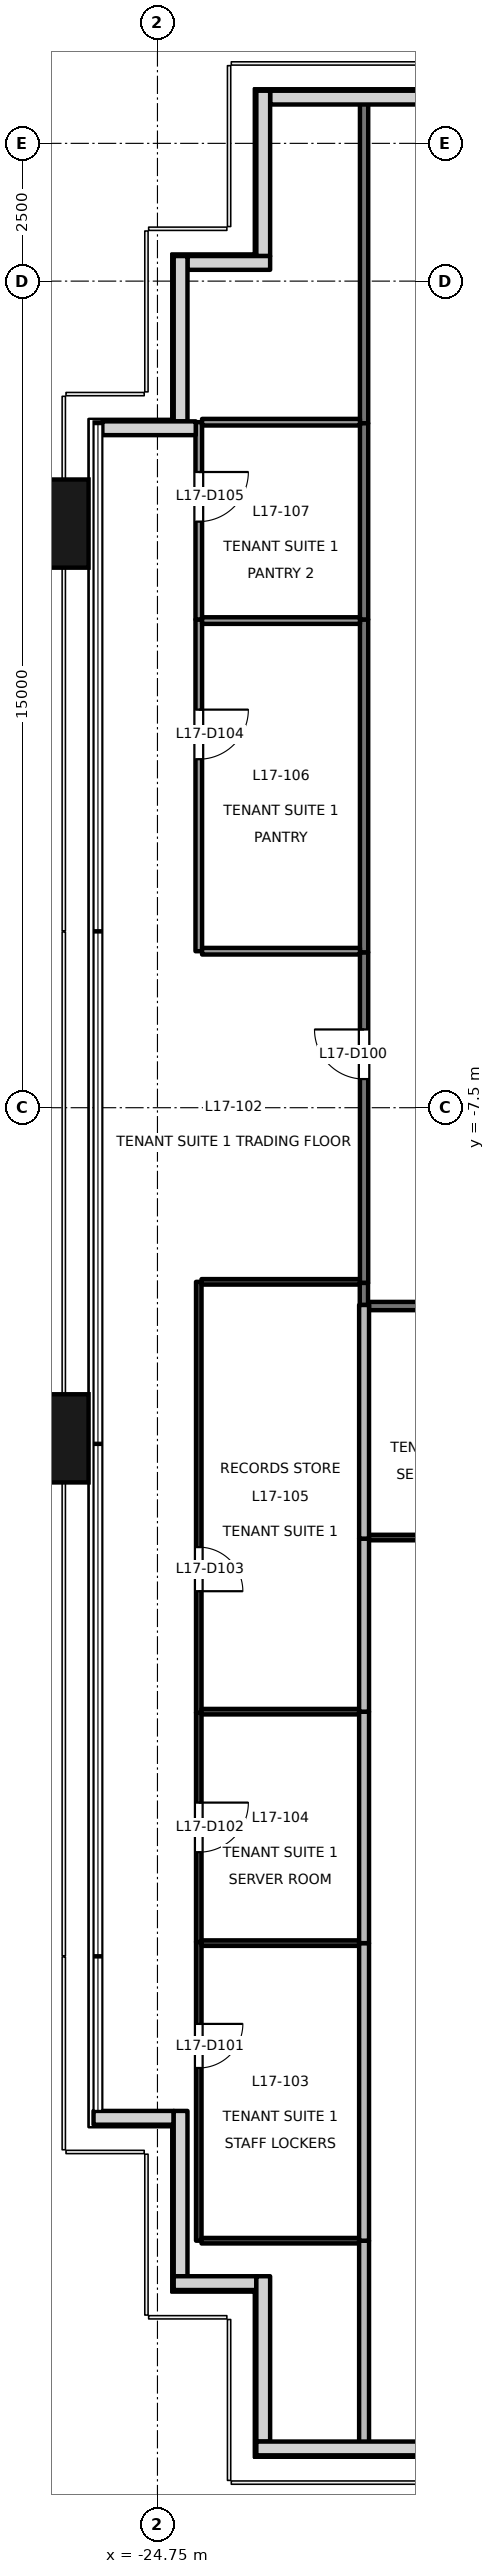
"""IFC4 building model, lengths in metres.
Left out: names, types, materials, properties, quantities, classifications, styles, units other than length and angle.
Written with IfcOpenShell. Run it as: python <this file> out.ifc"""

import sys

from ifc_helpers import new_model, si_unit, direction, frame, frame_2d, origin, origin_2d, place, context, subcontext, project, spatial, rectangle, extrude, element, fill, save


model = new_model("IFC4")
c1 = context("Model", 3, precision=1e-05, world=origin(), true_north=direction((0.0, 1.0)))
c2 = subcontext(c1, "Body", "Model", "MODEL_VIEW")
j1 = project(units=[si_unit("LENGTHUNIT", "METRE"), si_unit("PLANEANGLEUNIT", "RADIAN")], contexts=[c1])
p1 = place(None, origin())
s1 = spatial("IfcSite", under=j1, at=p1, CompositionType="ELEMENT")
p2 = place(p1, origin())
s2 = spatial("IfcBuilding", under=s1, at=p2, CompositionType="ELEMENT")
p3 = place(p2, frame((0.0, 0.0, 79.7)))
s3 = spatial("IfcBuildingStorey", under=s2, at=p3, CompositionType="ELEMENT", Elevation=79.7)
for number, where, z_axis, x_axis in (
    (1, (-26.9, -13.5, -0.2), (0.0, 0.0, 1.0), (0.0, 1.0, 0.0)),
    (2, (-26.9, 3.1, -0.2), (0.0, 0.0, 1.0), (0.0, 1.0, 0.0)),
):
    element("IfcColumn", number, at=place(p3, frame(where, z_axis=z_axis, x_axis=x_axis)), inside=s3, PredefinedType="COLUMN", context=c2, shape_type="SweptSolid", body=[
        extrude(rectangle(XDim=1.6, YDim=1.8, at=origin_2d()), origin(), (0.0, 0.0, 1.0), 4.0),
    ])
p4 = place(p3, frame((-20.0, 10.83, 0.0), z_axis=(0.0, 0.0, 1.0), x_axis=(-1.0, 0.0, 0.0)))
e3 = element("IfcWall", 3, at=p4, inside=s3, PredefinedType="SOLIDWALL", context=c2, shape_type="SweptSolid", body=[
    extrude(rectangle(XDim=2.705, YDim=0.25, at=frame_2d((1.353, 0.0))), origin(), (0.0, 0.0, 1.0), 3.8),
])
p5 = place(p3, frame((-22.83, 10.955, 0.0), z_axis=(0.0, 0.0, 1.0), x_axis=(0.0, -1.0, 0.0)))
e4 = element("IfcWall", 4, at=p5, inside=s3, PredefinedType="SOLIDWALL", context=c2, shape_type="SweptSolid", body=[
    extrude(rectangle(XDim=3.0, YDim=0.25, at=frame_2d((1.5, 0.0))), origin(), (0.0, 0.0, 1.0), 3.8),
])
p6 = place(p3, frame((-22.705, 7.83, 0.0), z_axis=(0.0, 0.0, 1.0), x_axis=(-1.0, 0.0, 0.0)))
e5 = element("IfcWall", 5, at=p6, inside=s3, PredefinedType="SOLIDWALL", context=c2, shape_type="SweptSolid", body=[
    extrude(rectangle(XDim=1.5, YDim=0.25, at=frame_2d((0.75, 0.0))), origin(), (0.0, 0.0, 1.0), 3.8),
])
p7 = place(p3, frame((-24.33, 7.955, 0.0), z_axis=(0.0, 0.0, 1.0), x_axis=(0.0, -1.0, 0.0)))
e6 = element("IfcWall", 6, at=p7, inside=s3, PredefinedType="SOLIDWALL", context=c2, shape_type="SweptSolid", body=[
    extrude(rectangle(XDim=3.0, YDim=0.25, at=frame_2d((1.5, 0.0))), origin(), (0.0, 0.0, 1.0), 3.8),
])
p8 = place(p3, frame((-24.055, 4.83, 0.0), z_axis=(0.0, 0.0, 1.0), x_axis=(-1.0, 0.0, 0.0)))
e7 = element("IfcWall", 7, at=p8, inside=s3, PredefinedType="SOLIDWALL", context=c2, shape_type="SweptSolid", body=[
    extrude(rectangle(XDim=1.695, YDim=0.25, at=frame_2d((0.848, 0.0))), origin(), (0.0, 0.0, 1.0), 3.8),
])
p9 = place(p3, frame((-25.91, -25.83, 0.0), z_axis=(0.0, 0.0, 1.0), x_axis=(1.0, 0.0, 0.0)))
e8 = element("IfcWall", 8, at=p9, inside=s3, PredefinedType="SOLIDWALL", context=c2, shape_type="SweptSolid", body=[
    extrude(rectangle(XDim=1.455, YDim=0.25, at=frame_2d((0.728, 0.0))), origin(), (0.0, 0.0, 1.0), 3.8),
])
p10 = place(p3, frame((-24.33, -25.705, 0.0), z_axis=(0.0, 0.0, 1.0), x_axis=(0.0, -1.0, 0.0)))
e9 = element("IfcWall", 9, at=p10, inside=s3, PredefinedType="SOLIDWALL", context=c2, shape_type="SweptSolid", body=[
    extrude(rectangle(XDim=3.0, YDim=0.25, at=frame_2d((1.5, 0.0))), origin(), (0.0, 0.0, 1.0), 3.8),
])
p11 = place(p3, frame((-24.455, -28.83, 0.0), z_axis=(0.0, 0.0, 1.0), x_axis=(1.0, 0.0, 0.0)))
e10 = element("IfcWall", 10, at=p11, inside=s3, PredefinedType="SOLIDWALL", context=c2, shape_type="SweptSolid", body=[
    extrude(rectangle(XDim=1.5, YDim=0.25, at=frame_2d((0.75, 0.0))), origin(), (0.0, 0.0, 1.0), 3.8),
])
p12 = place(p3, frame((-22.83, -28.705, 0.0), z_axis=(0.0, 0.0, 1.0), x_axis=(0.0, -1.0, 0.0)))
e11 = element("IfcWall", 11, at=p12, inside=s3, PredefinedType="SOLIDWALL", context=c2, shape_type="SweptSolid", body=[
    extrude(rectangle(XDim=3.0, YDim=0.25, at=frame_2d((1.5, 0.0))), origin(), (0.0, 0.0, 1.0), 3.8),
])
p13 = place(p3, frame((-22.955, -31.83, 0.0), z_axis=(0.0, 0.0, 1.0), x_axis=(1.0, 0.0, 0.0)))
e12 = element("IfcWall", 12, at=p13, inside=s3, PredefinedType="SOLIDWALL", context=c2, shape_type="SweptSolid", body=[
    extrude(rectangle(XDim=2.955, YDim=0.25, at=frame_2d((1.478, 0.0))), origin(), (0.0, 0.0, 1.0), 3.8),
])
p14 = place(p3, frame((-21.0, -10.68, 0.0), z_axis=(0.0, 0.0, 1.0), x_axis=(0.0, 1.0, 0.0)))
e13 = element("IfcWall", 13, at=p14, inside=s3, PredefinedType="PARTITIONING", context=c2, shape_type="SweptSolid", body=[
    extrude(rectangle(XDim=6.0, YDim=0.15, at=frame_2d((3.0, 0.0))), origin(), (0.0, 0.0, 1.0), 3.8),
])
p15 = place(p14, frame((3.7, 0.0, 0.0)))
e14 = element("IfcOpeningElement", 14, at=p15, cuts=e13, PredefinedType="OPENING", context=c2, shape_type="SweptSolid", body=[
    extrude(rectangle(XDim=0.9, YDim=2.1, at=frame_2d((0.45, 1.05))), frame((0.0, 0.085, 0.0), z_axis=(0.0, -1.0, 0.0), x_axis=(1.0, 0.0, 0.0)), (0.0, 0.0, 1.0), 0.171),
])
p16 = place(p3, frame((-21.0, 4.92, 0.0), z_axis=(0.0, 0.0, 1.0), x_axis=(0.0, 1.0, 0.0)))
e15 = element("IfcWall", 15, at=p16, inside=s3, PredefinedType="PARTITIONING", context=c2, shape_type="SweptSolid", body=[
    extrude(rectangle(XDim=5.82, YDim=0.15, at=frame_2d((2.91, 0.0))), origin(), (0.0, 0.0, 1.0), 3.8),
])
p17 = place(p3, frame((-21.003, -11.08, 0.0), z_axis=(0.0, 0.0, 1.0), x_axis=(0.0, 1.0, 0.0)))
e16 = element("IfcWall", 16, at=p17, inside=s3, PredefinedType="PARTITIONING", context=c2, shape_type="SweptSolid", body=[
    extrude(rectangle(XDim=0.4, YDim=0.15, at=frame_2d((0.2, 0.0))), origin(), (0.0, 0.0, 1.0), 3.8),
])
p18 = place(p3, frame((-21.0, -4.68, 0.0), z_axis=(0.0, 0.0, 1.0), x_axis=(0.0, 1.0, 0.0)))
e17 = element("IfcWall", 17, at=p18, inside=s3, PredefinedType="PARTITIONING", context=c2, shape_type="SweptSolid", body=[
    extrude(rectangle(XDim=6.04, YDim=0.15, at=frame_2d((3.02, 0.0))), origin(), (0.0, 0.0, 1.0), 3.4),
])
p19 = place(p3, frame((-21.0, 1.36, 0.0), z_axis=(0.0, 0.0, 1.0), x_axis=(0.0, 1.0, 0.0)))
e18 = element("IfcWall", 18, at=p19, inside=s3, PredefinedType="PARTITIONING", context=c2, shape_type="SweptSolid", body=[
    extrude(rectangle(XDim=3.56, YDim=0.15, at=frame_2d((1.78, 0.0))), origin(), (0.0, 0.0, 1.0), 3.4),
])
p20 = place(p3, frame((-18.02, -11.099, 0.0), z_axis=(0.0, 0.0, 1.0), x_axis=(-1.0, 0.0, 0.0)))
e19 = element("IfcWall", 19, at=p20, inside=s3, PredefinedType="PARTITIONING", context=c2, shape_type="SweptSolid", body=[
    extrude(rectangle(XDim=2.89, YDim=0.15, at=frame_2d((1.445, 0.0))), origin(), (0.0, 0.0, 1.0), 3.8),
])
p21 = place(p3, frame((-24.0, -22.64, 0.0), z_axis=(0.0, 0.0, 1.0), x_axis=(0.0, -1.0, 0.0)))
e20 = element("IfcWall", 20, at=p21, inside=s3, PredefinedType="PARTITIONING", context=c2, shape_type="SweptSolid", body=[
    extrude(rectangle(XDim=5.42, YDim=0.1, at=frame_2d((2.71, 0.0))), origin(), (0.0, 0.0, 1.0), 3.8),
])
p22 = place(p21, frame((1.486, 0.0, 0.0)))
e21 = element("IfcOpeningElement", 21, at=p22, cuts=e20, PredefinedType="OPENING", context=c2, shape_type="SweptSolid", body=[
    extrude(rectangle(XDim=0.8, YDim=2.1, at=frame_2d((0.4, 1.05))), frame((0.0, 0.061, 0.0), z_axis=(0.0, -1.0, 0.0), x_axis=(1.0, 0.0, 0.0)), (0.0, 0.0, 1.0), 0.121),
])
p23 = place(p3, frame((-23.95, -28.06, 0.0), z_axis=(0.0, 0.0, 1.0), x_axis=(1.0, 0.0, 0.0)))
e22 = element("IfcWall", 22, at=p23, inside=s3, PredefinedType="PARTITIONING", context=c2, shape_type="SweptSolid", body=[
    extrude(rectangle(XDim=2.86, YDim=0.1, at=frame_2d((1.43, 0.0))), origin(), (0.0, 0.0, 1.0), 3.8),
])
p24 = place(p3, frame((-24.0, -18.48, 0.0), z_axis=(0.0, 0.0, 1.0), x_axis=(0.0, -1.0, 0.0)))
e23 = element("IfcWall", 23, at=p24, inside=s3, PredefinedType="PARTITIONING", context=c2, shape_type="SweptSolid", body=[
    extrude(rectangle(XDim=4.16, YDim=0.1, at=frame_2d((2.08, 0.0))), origin(), (0.0, 0.0, 1.0), 3.8),
])
p25 = place(p24, frame((1.63, 0.0, 0.0)))
e24 = element("IfcOpeningElement", 24, at=p25, cuts=e23, PredefinedType="OPENING", context=c2, shape_type="SweptSolid", body=[
    extrude(rectangle(XDim=0.9, YDim=2.1, at=frame_2d((0.45, 1.05))), frame((0.0, 0.061, 0.0), z_axis=(0.0, -1.0, 0.0), x_axis=(1.0, 0.0, 0.0)), (0.0, 0.0, 1.0), 0.121),
])
p26 = place(p3, frame((-24.0, -10.66, 0.0), z_axis=(0.0, 0.0, 1.0), x_axis=(0.0, -1.0, 0.0)))
e25 = element("IfcWall", 25, at=p26, inside=s3, PredefinedType="PARTITIONING", context=c2, shape_type="SweptSolid", body=[
    extrude(rectangle(XDim=7.82, YDim=0.1, at=frame_2d((3.91, 0.0))), origin(), (0.0, 0.0, 1.0), 3.8),
])
p27 = place(p26, frame((4.814, 0.0, 0.0)))
e26 = element("IfcOpeningElement", 26, at=p27, cuts=e25, PredefinedType="OPENING", context=c2, shape_type="SweptSolid", body=[
    extrude(rectangle(XDim=0.8, YDim=2.1, at=frame_2d((0.4, 1.05))), frame((0.0, 0.061, 0.0), z_axis=(0.0, -1.0, 0.0), x_axis=(1.0, 0.0, 0.0)), (0.0, 0.0, 1.0), 0.121),
])
p28 = place(p3, frame((-21.075, -10.66, 0.0), z_axis=(0.0, 0.0, 1.0), x_axis=(-1.0, 0.0, 0.0)))
e27 = element("IfcWall", 27, at=p28, inside=s3, PredefinedType="PARTITIONING", context=c2, shape_type="SweptSolid", body=[
    extrude(rectangle(XDim=2.875, YDim=0.1, at=frame_2d((1.438, 0.0))), origin(), (0.0, 0.0, 1.0), 3.8),
])
p29 = place(p3, frame((-24.0, 1.36, 0.0), z_axis=(0.0, 0.0, 1.0), x_axis=(0.0, -1.0, 0.0)))
e28 = element("IfcWall", 28, at=p29, inside=s3, PredefinedType="PARTITIONING", context=c2, shape_type="SweptSolid", body=[
    extrude(rectangle(XDim=6.02, YDim=0.12, at=frame_2d((3.01, 0.0))), origin(), (0.0, 0.0, 1.0), 3.4),
])
p30 = place(p29, frame((1.636, 0.0, 0.0)))
e29 = element("IfcOpeningElement", 29, at=p30, cuts=e28, PredefinedType="OPENING", context=c2, shape_type="SweptSolid", body=[
    extrude(rectangle(XDim=0.9, YDim=2.1, at=frame_2d((0.45, 1.05))), frame((0.0, 0.071, 0.0), z_axis=(0.0, -1.0, 0.0), x_axis=(1.0, 0.0, 0.0)), (0.0, 0.0, 1.0), 0.141),
])
p31 = place(p3, frame((-23.94, -4.66, 0.0), z_axis=(0.0, 0.0, 1.0), x_axis=(1.0, 0.0, 0.0)))
e30 = element("IfcWall", 30, at=p31, inside=s3, PredefinedType="PARTITIONING", context=c2, shape_type="SweptSolid", body=[
    extrude(rectangle(XDim=2.865, YDim=0.12, at=frame_2d((1.433, 0.0))), origin(), (0.0, 0.0, 1.0), 3.8),
])
p32 = place(p3, frame((-24.0, 4.94, 0.0), z_axis=(0.0, 0.0, 1.0), x_axis=(0.0, -1.0, 0.0)))
e31 = element("IfcWall", 31, at=p32, inside=s3, PredefinedType="PARTITIONING", context=c2, shape_type="SweptSolid", body=[
    extrude(rectangle(XDim=3.58, YDim=0.12, at=frame_2d((1.79, 0.0))), origin(), (0.0, 0.0, 1.0), 3.4),
])
p33 = place(p32, frame((0.904, 0.0, 0.0)))
e32 = element("IfcOpeningElement", 32, at=p33, cuts=e31, PredefinedType="OPENING", context=c2, shape_type="SweptSolid", body=[
    extrude(rectangle(XDim=0.9, YDim=2.1, at=frame_2d((0.45, 1.05))), frame((0.0, 0.071, 0.0), z_axis=(0.0, -1.0, 0.0), x_axis=(1.0, 0.0, 0.0)), (0.0, 0.0, 1.0), 0.141),
])
p34 = place(p3, frame((-21.075, 4.94, 0.0), z_axis=(0.0, 0.0, 1.0), x_axis=(-1.0, 0.0, 0.0)))
e33 = element("IfcWall", 33, at=p34, inside=s3, PredefinedType="PARTITIONING", context=c2, shape_type="SweptSolid", body=[
    extrude(rectangle(XDim=2.865, YDim=0.12, at=frame_2d((1.433, 0.0))), origin(), (0.0, 0.0, 1.0), 3.8),
])
p35 = place(p3, frame((-21.0, -28.06, 0.0), z_axis=(0.0, 0.0, 1.0), x_axis=(0.0, -1.0, 0.0)))
e34 = element("IfcWall", 34, at=p35, inside=s3, PredefinedType="PARTITIONING", context=c2, shape_type="SweptSolid", body=[
    extrude(rectangle(XDim=3.68, YDim=0.18, at=frame_2d((1.84, 0.0))), origin(), (0.0, 0.0, 1.0), 3.8),
])
p36 = place(p3, frame((-23.95, -22.66, 0.0), z_axis=(0.0, 0.0, 1.0), x_axis=(1.0, 0.0, 0.0)))
e35 = element("IfcWall", 35, at=p36, inside=s3, PredefinedType="PARTITIONING", context=c2, shape_type="SweptSolid", body=[
    extrude(rectangle(XDim=2.86, YDim=0.1, at=frame_2d((1.43, 0.0))), origin(), (0.0, 0.0, 1.0), 3.8),
])
p37 = place(p3, frame((-21.0, -22.66, 0.0), z_axis=(0.0, 0.0, 1.0), x_axis=(0.0, -1.0, 0.0)))
e36 = element("IfcWall", 36, at=p37, inside=s3, PredefinedType="PARTITIONING", context=c2, shape_type="SweptSolid", body=[
    extrude(rectangle(XDim=5.4, YDim=0.18, at=frame_2d((2.7, 0.0))), origin(), (0.0, 0.0, 1.0), 3.8),
])
p38 = place(p3, frame((-23.95, -18.46, 0.0), z_axis=(0.0, 0.0, 1.0), x_axis=(1.0, 0.0, 0.0)))
e37 = element("IfcWall", 37, at=p38, inside=s3, PredefinedType="PARTITIONING", context=c2, shape_type="SweptSolid", body=[
    extrude(rectangle(XDim=2.86, YDim=0.1, at=frame_2d((1.43, 0.0))), origin(), (0.0, 0.0, 1.0), 3.8),
])
p39 = place(p3, frame((-21.0, -18.46, 0.0), z_axis=(0.0, 0.0, 1.0), x_axis=(0.0, -1.0, 0.0)))
e38 = element("IfcWall", 38, at=p39, inside=s3, PredefinedType="PARTITIONING", context=c2, shape_type="SweptSolid", body=[
    extrude(rectangle(XDim=4.2, YDim=0.18, at=frame_2d((2.1, 0.0))), origin(), (0.0, 0.0, 1.0), 3.8),
])
p40 = place(p3, frame((-21.0, -15.32, 0.0), z_axis=(0.0, 0.0, 1.0), x_axis=(0.0, -1.0, 0.0)))
e39 = element("IfcWall", 39, at=p40, inside=s3, PredefinedType="PARTITIONING", context=c2, shape_type="SweptSolid", body=[
    extrude(rectangle(XDim=3.14, YDim=0.18, at=frame_2d((1.57, 0.0))), origin(), (0.0, 0.0, 1.0), 3.8),
])
p41 = place(p3, frame((-21.0, -11.08, 0.0), z_axis=(0.0, 0.0, 1.0), x_axis=(0.0, -1.0, 0.0)))
e40 = element("IfcWall", 40, at=p41, inside=s3, PredefinedType="PARTITIONING", context=c2, shape_type="SweptSolid", body=[
    extrude(rectangle(XDim=4.24, YDim=0.18, at=frame_2d((2.12, 0.0))), origin(), (0.0, 0.0, 1.0), 3.8),
])
p42 = place(p3, frame((-23.94, 1.34, 0.0), z_axis=(0.0, 0.0, 1.0), x_axis=(1.0, 0.0, 0.0)))
e41 = element("IfcWall", 41, at=p42, inside=s3, PredefinedType="PARTITIONING", context=c2, shape_type="SweptSolid", body=[
    extrude(rectangle(XDim=2.865, YDim=0.12, at=frame_2d((1.433, 0.0))), origin(), (0.0, 0.0, 1.0), 3.8),
])
p43 = place(p3, frame((-20.91, -15.3, 0.0), z_axis=(0.0, 0.0, 1.0), x_axis=(1.0, 0.0, 0.0)))
e42 = element("IfcWall", 42, at=p43, inside=s3, PredefinedType="PARTITIONING", context=c2, shape_type="SweptSolid", body=[
    extrude(rectangle(XDim=2.86, YDim=0.1, at=frame_2d((1.43, 0.0))), origin(), (0.0, 0.0, 1.0), 3.8),
])
p44 = place(p15, origin())
e43 = element("IfcDoor", 43, at=p44, inside=s3, OperationType="SINGLE_SWING_RIGHT", PredefinedType="DOOR", context=c2, shape_type="SweptSolid", body=[
    extrude(rectangle(XDim=0.9, YDim=2.1, at=frame_2d((0.45, 1.05))), frame((0.0, 0.025, 0.0), z_axis=(0.0, -1.0, 0.0), x_axis=(1.0, 0.0, 0.0)), (0.0, 0.0, 1.0), 0.05),
])
fill(e14, e43)
p45 = place(p22, origin())
e44 = element("IfcDoor", 44, at=p45, inside=s3, OperationType="SINGLE_SWING_LEFT", PredefinedType="DOOR", context=c2, shape_type="SweptSolid", body=[
    extrude(rectangle(XDim=0.8, YDim=2.1, at=frame_2d((0.4, 1.05))), frame((0.0, 0.025, 0.0), z_axis=(0.0, -1.0, 0.0), x_axis=(1.0, 0.0, 0.0)), (0.0, 0.0, 1.0), 0.05),
])
fill(e21, e44)
p46 = place(p25, origin())
e45 = element("IfcDoor", 45, at=p46, inside=s3, OperationType="SINGLE_SWING_LEFT", PredefinedType="DOOR", context=c2, shape_type="SweptSolid", body=[
    extrude(rectangle(XDim=0.9, YDim=2.1, at=frame_2d((0.45, 1.05))), frame((0.0, 0.025, 0.0), z_axis=(0.0, -1.0, 0.0), x_axis=(1.0, 0.0, 0.0)), (0.0, 0.0, 1.0), 0.05),
])
fill(e24, e45)
p47 = place(p27, origin())
e46 = element("IfcDoor", 46, at=p47, inside=s3, OperationType="SINGLE_SWING_RIGHT", PredefinedType="DOOR", context=c2, shape_type="SweptSolid", body=[
    extrude(rectangle(XDim=0.8, YDim=2.1, at=frame_2d((0.4, 1.05))), frame((0.0, 0.025, 0.0), z_axis=(0.0, -1.0, 0.0), x_axis=(1.0, 0.0, 0.0)), (0.0, 0.0, 1.0), 0.05),
])
fill(e26, e46)
p48 = place(p30, origin())
e47 = element("IfcDoor", 47, at=p48, inside=s3, OperationType="SINGLE_SWING_LEFT", PredefinedType="DOOR", context=c2, shape_type="SweptSolid", body=[
    extrude(rectangle(XDim=0.9, YDim=2.1, at=frame_2d((0.45, 1.05))), frame((0.0, 0.025, 0.0), z_axis=(0.0, -1.0, 0.0), x_axis=(1.0, 0.0, 0.0)), (0.0, 0.0, 1.0), 0.05),
])
fill(e29, e47)
p49 = place(p33, origin())
e48 = element("IfcDoor", 48, at=p49, inside=s3, OperationType="SINGLE_SWING_LEFT", PredefinedType="DOOR", context=c2, shape_type="SweptSolid", body=[
    extrude(rectangle(XDim=0.9, YDim=2.1, at=frame_2d((0.45, 1.05))), frame((0.0, 0.025, 0.0), z_axis=(0.0, -1.0, 0.0), x_axis=(1.0, 0.0, 0.0)), (0.0, 0.0, 1.0), 0.05),
])
fill(e32, e48)
save(model, sys.argv[1])
